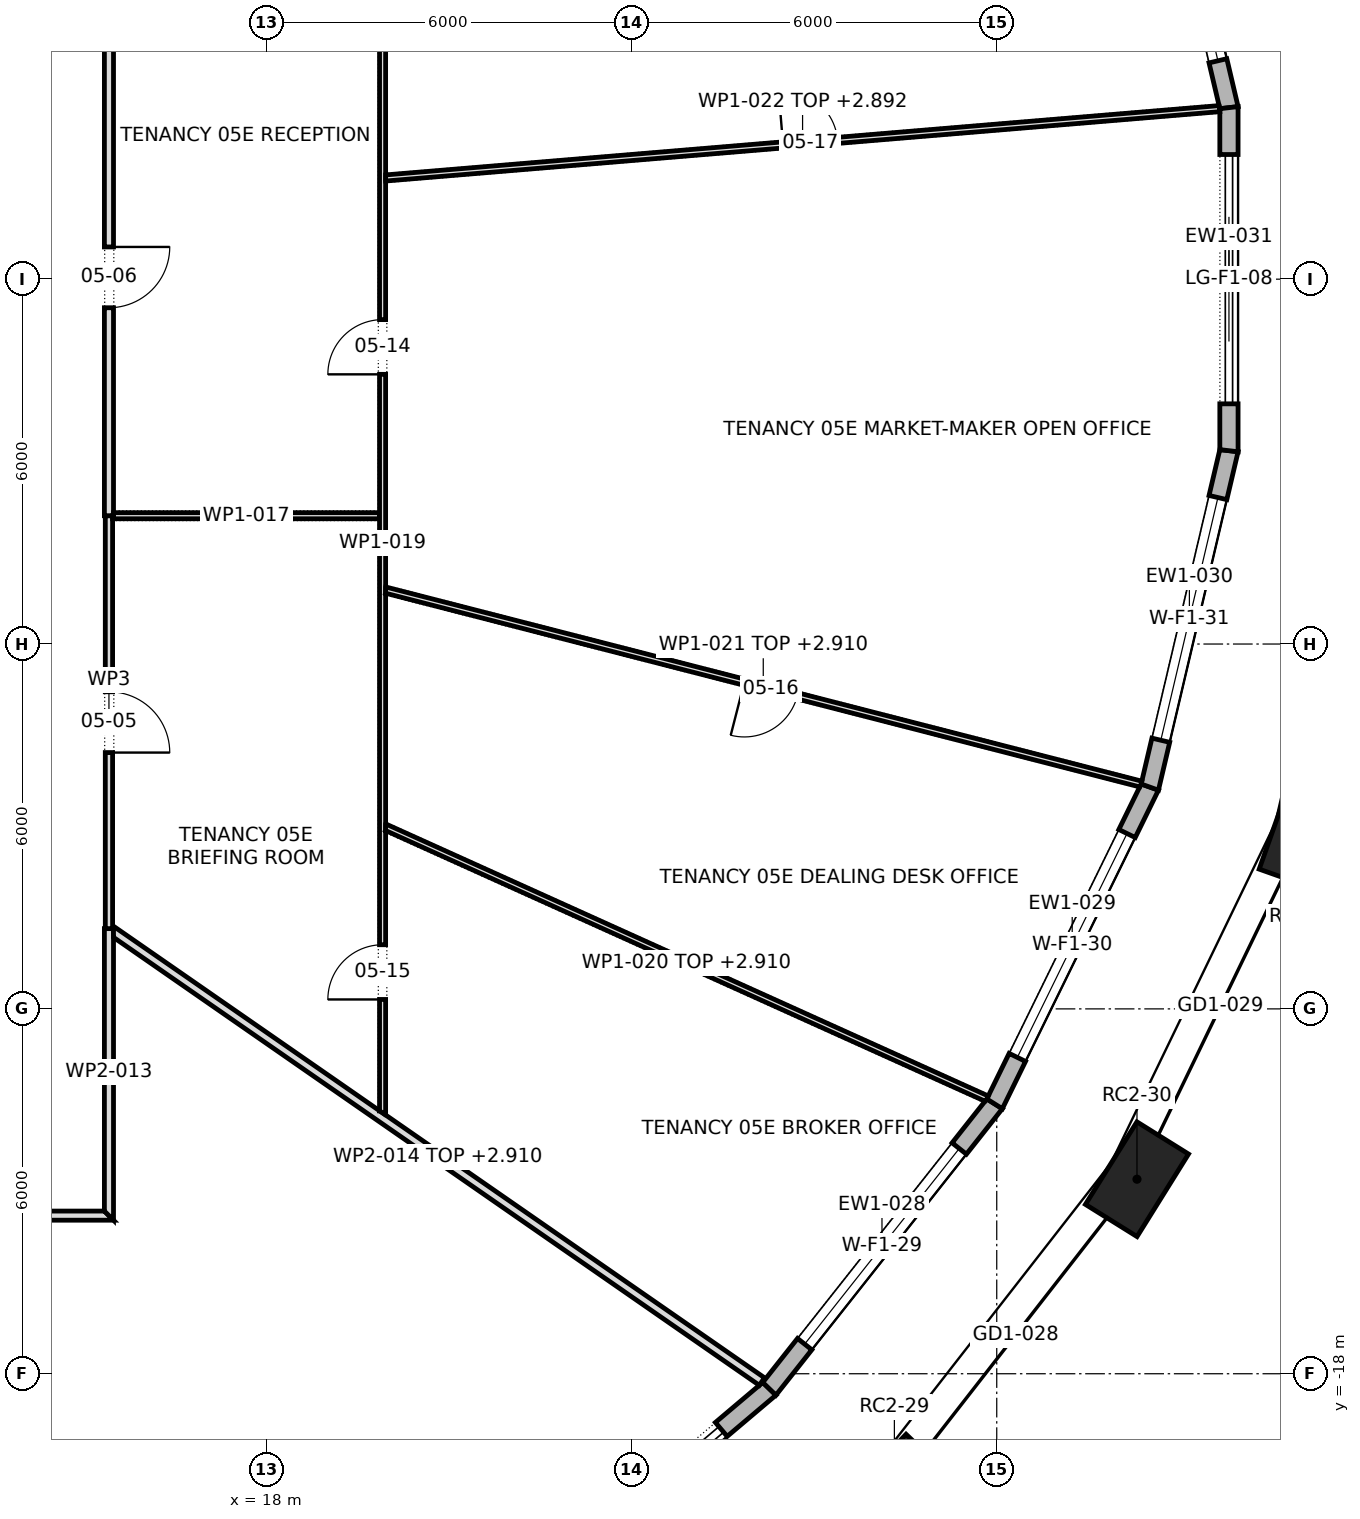
"""IFC4 building model, lengths in metres.
Left out: names, types, materials, properties, quantities, classifications, styles, units other than length and angle.
Written with IfcOpenShell. Run it as: python <this file> out.ifc"""

import sys

from ifc_helpers import new_model, si_unit, direction, frame, frame_2d, origin, origin_2d, place, context, subcontext, project, spatial, polyline, rectangle, outline, extrude, element, fill, save


model = new_model("IFC4")
c1 = context("Model", 3, precision=1e-05, world=origin(), true_north=direction((0.0, 1.0)))
c2 = subcontext(c1, "Body", "Model", "MODEL_VIEW")
j1 = project(units=[si_unit("LENGTHUNIT", "METRE"), si_unit("PLANEANGLEUNIT", "RADIAN")], contexts=[c1])
p1 = place(None, origin())
s1 = spatial("IfcSite", under=j1, at=p1, CompositionType="ELEMENT")
p2 = place(p1, origin())
s2 = spatial("IfcBuilding", under=s1, at=p2, CompositionType="ELEMENT")
p3 = place(p2, frame((0.0, 0.0, 73.9)))
s3 = spatial("IfcBuildingStorey", under=s2, at=p3, CompositionType="ELEMENT", Elevation=73.9)
for number, where, z_axis, x_axis in (
    (1, (28.317, -19.919, 0.0), (0.0, 0.0, 1.0), (0.692, 0.722, 0.0)),
    (2, (32.306, -14.801, 0.0), (0.0, 0.0, 1.0), (0.529, 0.849, 0.0)),
    (3, (35.054, -9.115, 0.0), (0.0, 0.0, 1.0), (0.334, 0.943, 0.0)),
):
    element("IfcColumn", number, at=place(p3, frame(where, z_axis=z_axis, x_axis=x_axis)), inside=s3, PredefinedType="COLUMN", context=c2, shape_type="SweptSolid", body=[
        extrude(rectangle(XDim=1.6, YDim=1.0, at=origin_2d()), origin(), (0.0, 0.0, 1.0), 4.2),
    ])
p4 = place(p3, frame((33.819, 2.821, 0.0), z_axis=(0.0, 0.0, 1.0), x_axis=(-0.229058489262, 0.97341266095, 0.0)))
e4 = element("IfcWall", 4, at=p4, inside=s3, PredefinedType="STANDARD", context=c2, shape_type="SweptSolid", body=[
    extrude(outline(polyline([(-0.017, -0.15), (5.7, -0.15), (5.666, 0.15), (0.017, 0.15), (-0.017, -0.15)])), origin(), (0.0, 0.0, 1.0), 3.9),
])
p5 = place(p4, frame((0.792, 0.0, 0.6)))
e5 = element("IfcOpeningElement", 5, at=p5, cuts=e4, PredefinedType="OPENING", context=c2, shape_type="SweptSolid", body=[
    extrude(rectangle(XDim=4.1, YDim=2.85, at=frame_2d((2.05, 1.425))), frame((0.0, 0.162, 0.0), z_axis=(0.0, -1.0, 0.0), x_axis=(1.0, 0.0, 0.0)), (0.0, 0.0, 1.0), 0.324),
])
p6 = place(p3, frame((21.549, -22.231, 0.0), z_axis=(0.0, 0.0, 1.0), x_axis=(0.763693886759, 0.645578536916, 0.0)))
e6 = element("IfcWall", 6, at=p6, inside=s3, PredefinedType="STANDARD", context=c2, shape_type="SweptSolid", body=[
    extrude(outline(polyline([(-0.014, -0.15), (6.185, -0.15), (6.155, 0.15), (0.014, 0.15), (-0.014, -0.15)])), origin(), (0.0, 0.0, 1.0), 3.9),
])
p7 = place(p6, frame((1.035, 0.0, 0.0)))
e7 = element("IfcOpeningElement", 7, at=p7, cuts=e6, PredefinedType="OPENING", context=c2, shape_type="SweptSolid", body=[
    extrude(rectangle(XDim=4.1, YDim=3.45, at=frame_2d((2.05, 1.725))), frame((0.0, 0.162, 0.0), z_axis=(0.0, -1.0, 0.0), x_axis=(1.0, 0.0, 0.0)), (0.0, 0.0, 1.0), 0.324),
])
p8 = place(p3, frame((26.26, -18.248, 0.0), z_axis=(0.0, 0.0, 1.0), x_axis=(0.620093447965, 0.784527957303, 0.0)))
e8 = element("IfcWall", 8, at=p8, inside=s3, PredefinedType="STANDARD", context=c2, shape_type="SweptSolid", body=[
    extrude(outline(polyline([(-0.015, -0.15), (5.989, -0.15), (5.957, 0.15), (0.015, 0.15), (-0.015, -0.15)])), origin(), (0.0, 0.0, 1.0), 3.9),
])
p9 = place(p8, frame((0.937, 0.0, 0.6)))
e9 = element("IfcOpeningElement", 9, at=p9, cuts=e8, PredefinedType="OPENING", context=c2, shape_type="SweptSolid", body=[
    extrude(rectangle(XDim=4.1, YDim=2.85, at=frame_2d((2.05, 1.425))), frame((0.0, 0.162, 0.0), z_axis=(0.0, -1.0, 0.0), x_axis=(1.0, 0.0, 0.0)), (0.0, 0.0, 1.0), 0.324),
])
p10 = place(p3, frame((29.964, -13.562, 0.0), z_axis=(0.0, 0.0, 1.0), x_axis=(0.440027465772, 0.897984314655, 0.0)))
e10 = element("IfcWall", 10, at=p10, inside=s3, PredefinedType="STANDARD", context=c2, shape_type="SweptSolid", body=[
    extrude(outline(polyline([(-0.016, -0.15), (5.818, -0.15), (5.784, 0.15), (0.016, 0.15), (-0.016, -0.15)])), origin(), (0.0, 0.0, 1.0), 3.9),
])
p11 = place(p10, frame((0.85, 0.0, 0.6)))
e11 = element("IfcOpeningElement", 11, at=p11, cuts=e10, PredefinedType="OPENING", context=c2, shape_type="SweptSolid", body=[
    extrude(rectangle(XDim=4.1, YDim=2.85, at=frame_2d((2.05, 1.425))), frame((0.0, 0.162, 0.0), z_axis=(0.0, -1.0, 0.0), x_axis=(1.0, 0.0, 0.0)), (0.0, 0.0, 1.0), 0.324),
])
p12 = place(p3, frame((32.517, -8.353, 0.0), z_axis=(0.0, 0.0, 1.0), x_axis=(0.229058489262, 0.97341266095, 0.0)))
e12 = element("IfcWall", 12, at=p12, inside=s3, PredefinedType="STANDARD", context=c2, shape_type="SweptSolid", body=[
    extrude(outline(polyline([(-0.017, -0.15), (5.7, -0.15), (5.666, 0.15), (0.017, 0.15), (-0.017, -0.15)])), origin(), (0.0, 0.0, 1.0), 3.9),
])
p13 = place(p12, frame((0.792, 0.0, 0.6)))
e13 = element("IfcOpeningElement", 13, at=p13, cuts=e12, PredefinedType="OPENING", context=c2, shape_type="SweptSolid", body=[
    extrude(rectangle(XDim=4.1, YDim=2.85, at=frame_2d((2.05, 1.425))), frame((0.0, 0.162, 0.0), z_axis=(0.0, -1.0, 0.0), x_axis=(1.0, 0.0, 0.0)), (0.0, 0.0, 1.0), 0.324),
])
p14 = place(p3, frame((33.819, -2.821, 0.0), z_axis=(0.0, 0.0, 1.0), x_axis=(0.0, 1.0, 0.0)))
e14 = element("IfcWall", 14, at=p14, inside=s3, PredefinedType="STANDARD", context=c2, shape_type="SweptSolid", body=[
    extrude(outline(polyline([(-0.017, -0.15), (5.658, -0.15), (5.624, 0.15), (0.017, 0.15), (-0.017, -0.15)])), origin(), (0.0, 0.0, 1.0), 3.9),
])
p15 = place(p14, frame((0.771, 0.0, 0.0)))
e15 = element("IfcOpeningElement", 15, at=p15, cuts=e14, PredefinedType="OPENING", context=c2, shape_type="SweptSolid", body=[
    extrude(rectangle(XDim=4.1, YDim=3.45, at=frame_2d((2.05, 1.725))), frame((0.0, 0.162, 0.0), z_axis=(0.0, -1.0, 0.0), x_axis=(1.0, 0.0, 0.0)), (0.0, 0.0, 1.0), 0.324),
])
p16 = place(p3, frame((-15.475, -15.4, 0.0), z_axis=(0.0, 0.0, 1.0), x_axis=(1.0, 0.0, 0.0)))
e16 = element("IfcWall", 16, at=p16, inside=s3, PredefinedType="PARTITIONING", context=c2, shape_type="SweptSolid", body=[
    extrude(outline(polyline([(0.0, -0.075), (1.935, -0.075), (3.869, -0.075), (5.803, -0.075), (7.738, -0.075), (9.672, -0.075), (11.606, -0.075), (13.541, -0.075), (15.475, -0.075), (17.409, -0.075), (19.344, -0.075), (21.278, -0.075), (23.212, -0.075), (25.147, -0.075), (27.081, -0.075), (29.016, -0.075), (30.95, -0.075), (30.8, 0.075), (28.885, 0.075), (26.969, 0.075), (25.053, 0.075), (23.138, 0.075), (21.222, 0.075), (19.306, 0.075), (17.391, 0.075), (15.475, 0.075), (13.56, 0.075), (11.644, 0.075), (9.728, 0.075), (7.812, 0.075), (5.897, 0.075), (3.981, 0.075), (2.066, 0.075), (0.15, 0.075), (0.0, -0.075)])), origin(), (0.0, 0.0, 1.0), 3.9),
])
p17 = place(p16, frame((2.405, 0.0, 0.0)))
e17 = element("IfcOpeningElement", 17, at=p17, cuts=e16, PredefinedType="OPENING", context=c2, shape_type="SweptSolid", body=[
    extrude(rectangle(XDim=1.0, YDim=2.1, at=frame_2d((0.5, 1.05))), frame((0.0, 0.087, 0.0), z_axis=(0.0, -1.0, 0.0), x_axis=(1.0, 0.0, 0.0)), (0.0, 0.0, 1.0), 0.174),
])
p18 = place(p16, frame((12.47, 0.0, 0.0)))
e18 = element("IfcOpeningElement", 18, at=p18, cuts=e16, PredefinedType="OPENING", context=c2, shape_type="SweptSolid", body=[
    extrude(rectangle(XDim=1.8, YDim=2.1, at=frame_2d((0.9, 1.05))), frame((0.0, 0.087, 0.0), z_axis=(0.0, -1.0, 0.0), x_axis=(1.0, 0.0, 0.0)), (0.0, 0.0, 1.0), 0.174),
])
p19 = place(p16, frame((25.04, 0.0, 0.0)))
e19 = element("IfcOpeningElement", 19, at=p19, cuts=e16, PredefinedType="OPENING", context=c2, shape_type="SweptSolid", body=[
    extrude(rectangle(XDim=1.8, YDim=2.1, at=frame_2d((0.9, 1.05))), frame((0.0, 0.087, 0.0), z_axis=(0.0, -1.0, 0.0), x_axis=(1.0, 0.0, 0.0)), (0.0, 0.0, 1.0), 0.174),
])
p20 = place(p3, frame((15.4, -10.68, 0.0), z_axis=(0.0, 0.0, 1.0), x_axis=(0.0, -1.0, 0.0)))
e20 = element("IfcWall", 20, at=p20, inside=s3, PredefinedType="PARTITIONING", context=c2, shape_type="SweptSolid", body=[
    extrude(outline(polyline([(0.0, -0.075), (1.548, -0.075), (3.097, -0.075), (4.645, -0.075), (4.795, 0.075), (3.197, 0.075), (1.598, 0.075), (0.0, 0.075), (0.0, -0.075)])), origin(), (0.0, 0.0, 1.0), 3.9),
])
p21 = place(p3, frame((15.418, -10.692, 0.0), z_axis=(0.0, 0.0, 1.0), x_axis=(0.821683258501, -0.569944403166, 0.0)))
e21 = element("IfcWall", 21, at=p21, inside=s3, PredefinedType="PARTITIONING", context=c2, shape_type="SweptSolid", body=[
    extrude(outline(polyline([(13.047, 0.075), (11.122, 0.075), (9.196, 0.075), (7.271, 0.075), (5.346, 0.075), (5.343, 0.073), (5.342, 0.075), (3.562, 0.075), (1.781, 0.075), (0.0, 0.075), (0.0, 0.074), (0.028, 0.034), (0.04, 0.043), (0.122, -0.075), (1.968, -0.075), (3.815, -0.075), (5.661, -0.075), (7.508, -0.075), (9.354, -0.075), (11.2, -0.075), (13.047, -0.075), (13.047, 0.075)])), origin(), (0.0, 0.0, 1.0), 2.91),
])
p22 = place(p3, frame((15.4, -3.89, 0.0), z_axis=(0.0, 0.0, 1.0), x_axis=(0.0, -1.0, 0.0)))
e22 = element("IfcWall", 22, at=p22, inside=s3, PredefinedType="PARTITIONING", context=c2, shape_type="SweptSolid", body=[
    extrude(rectangle(XDim=6.79, YDim=0.12, at=frame_2d((3.395, 0.0))), origin(), (0.0, 0.0, 1.0), 3.9),
])
p23 = place(p22, frame((2.895, 0.0, 0.0)))
e23 = element("IfcOpeningElement", 23, at=p23, cuts=e22, PredefinedType="OPENING", context=c2, shape_type="SweptSolid", body=[
    extrude(rectangle(XDim=1.0, YDim=2.1, at=frame_2d((0.5, 1.05))), frame((0.0, 0.072, 0.0), z_axis=(0.0, -1.0, 0.0), x_axis=(1.0, 0.0, 0.0)), (0.0, 0.0, 1.0), 0.144),
])
p24 = place(p3, frame((15.4, -3.89, 0.0), z_axis=(0.0, 0.0, 1.0), x_axis=(0.0, 1.0, 0.0)))
e24 = element("IfcWall", 24, at=p24, inside=s3, PredefinedType="PARTITIONING", context=c2, shape_type="SweptSolid", body=[
    extrude(outline(polyline([(0.0, -0.075), (1.937, -0.075), (3.873, -0.075), (5.809, -0.075), (7.746, -0.075), (9.682, -0.075), (11.619, -0.075), (13.555, -0.075), (15.492, -0.075), (17.428, -0.075), (19.365, -0.075), (19.215, 0.075), (17.293, 0.075), (15.372, 0.075), (13.45, 0.075), (11.529, 0.075), (9.607, 0.075), (7.686, 0.075), (5.764, 0.075), (3.843, 0.075), (1.921, 0.075), (0.0, 0.075), (0.0, -0.075)])), origin(), (0.0, 0.0, 1.0), 3.9),
])
p25 = place(p24, frame((3.42, 0.0, 0.0)))
e25 = element("IfcOpeningElement", 25, at=p25, cuts=e24, PredefinedType="OPENING", context=c2, shape_type="SweptSolid", body=[
    extrude(rectangle(XDim=1.0, YDim=2.1, at=frame_2d((0.5, 1.05))), frame((0.0, 0.087, 0.0), z_axis=(0.0, -1.0, 0.0), x_axis=(1.0, 0.0, 0.0)), (0.0, 0.0, 1.0), 0.174),
])
p26 = place(p3, frame((15.46, -3.89, 0.0), z_axis=(0.0, 0.0, 1.0), x_axis=(1.0, 0.0, 0.0)))
e26 = element("IfcWall", 26, at=p26, inside=s3, PredefinedType="PARTITIONING", context=c2, shape_type="SweptSolid", body=[
    extrude(outline(polyline([(0.0, -0.05), (1.463, -0.05), (2.926, -0.05), (4.39, -0.05), (4.39, 0.05), (2.931, 0.05), (1.473, 0.05), (0.015, 0.05), (0.015, 0.0), (0.0, 0.0), (0.0, -0.05)])), origin(), (0.0, 0.0, 1.0), 3.9),
])
p27 = place(p3, frame((19.9, -13.744, 0.0), z_axis=(0.0, 0.0, 1.0), x_axis=(0.0, 1.0, 0.0)))
e27 = element("IfcWall", 27, at=p27, inside=s3, PredefinedType="PARTITIONING", context=c2, shape_type="SweptSolid", body=[
    extrude(outline(polyline([(0.0, -0.05), (1.559, -0.05), (3.118, -0.05), (4.677, -0.05), (4.678, -0.048), (4.683, -0.05), (6.631, -0.05), (8.58, -0.05), (8.58, -0.048), (8.588, -0.05), (10.286, -0.05), (11.985, -0.05), (13.683, -0.05), (15.382, -0.05), (17.081, -0.05), (18.779, -0.05), (18.779, -0.048), (18.754, 0.05), (16.984, 0.05), (15.214, 0.05), (13.444, 0.05), (11.674, 0.05), (9.904, 0.05), (9.904, 0.05), (9.804, 0.05), (9.804, 0.05), (7.857, 0.05), (5.91, 0.05), (3.963, 0.05), (2.016, 0.05), (0.069, 0.05), (0.0, -0.05), (0.0, -0.05)])), origin(), (0.0, 0.0, 1.0), 3.9),
])
p28 = place(p27, frame((12.179, 0.0, 0.0)))
e28 = element("IfcOpeningElement", 28, at=p28, cuts=e27, PredefinedType="OPENING", context=c2, shape_type="SweptSolid", body=[
    extrude(rectangle(XDim=0.9, YDim=2.1, at=frame_2d((0.45, 1.05))), frame((0.0, 0.062, 0.0), z_axis=(0.0, -1.0, 0.0), x_axis=(1.0, 0.0, 0.0)), (0.0, 0.0, 1.0), 0.124),
])
p29 = place(p27, frame((1.899, 0.0, 0.0)))
e29 = element("IfcOpeningElement", 29, at=p29, cuts=e27, PredefinedType="OPENING", context=c2, shape_type="SweptSolid", body=[
    extrude(rectangle(XDim=0.9, YDim=2.1, at=frame_2d((0.45, 1.05))), frame((0.0, 0.062, 0.0), z_axis=(0.0, -1.0, 0.0), x_axis=(1.0, 0.0, 0.0)), (0.0, 0.0, 1.0), 0.124),
])
p30 = place(p3, frame((19.93, -9.003, 0.0), z_axis=(0.0, 0.0, 1.0), x_axis=(0.911407001064, -0.41150610981, 0.0)))
e30 = element("IfcWall", 30, at=p30, inside=s3, PredefinedType="PARTITIONING", context=c2, shape_type="SweptSolid", body=[
    extrude(outline(polyline([(0.045, -0.05), (1.847, -0.05), (3.65, -0.05), (5.453, -0.05), (7.255, -0.05), (9.058, -0.05), (10.861, -0.05), (10.872, -0.004), (10.874, 0.05), (9.062, 0.05), (7.249, 0.05), (5.437, 0.05), (3.625, 0.05), (1.812, 0.05), (0.0, 0.05), (0.0, 0.049), (0.045, -0.05)])), origin(), (0.0, 0.0, 1.0), 2.91),
])
p31 = place(p3, frame((19.938, -5.11, 0.0), z_axis=(0.0, 0.0, 1.0), x_axis=(0.96855855203, -0.248785713594, 0.0)))
e31 = element("IfcWall", 31, at=p31, inside=s3, PredefinedType="PARTITIONING", context=c2, shape_type="SweptSolid", body=[
    extrude(outline(polyline([(0.025, -0.05), (1.855, -0.05), (3.684, -0.05), (5.513, -0.05), (7.342, -0.05), (9.171, -0.05), (11.0, -0.05), (12.829, -0.05), (12.839, -0.005), (12.839, 0.05), (11.005, 0.05), (9.17, 0.05), (7.336, 0.05), (5.502, 0.05), (3.668, 0.05), (1.834, 0.05), (0.0, 0.05), (0.0, 0.049), (0.025, -0.05)])), origin(), (0.0, 0.0, 1.0), 2.91),
])
p32 = place(p31, frame((6.103, 0.0, 0.0)))
e32 = element("IfcOpeningElement", 32, at=p32, cuts=e31, PredefinedType="OPENING", context=c2, shape_type="SweptSolid", body=[
    extrude(rectangle(XDim=0.9, YDim=2.1, at=frame_2d((0.45, 1.05))), frame((0.0, 0.062, 0.0), z_axis=(0.0, -1.0, 0.0), x_axis=(1.0, 0.0, 0.0)), (0.0, 0.0, 1.0), 0.124),
])
p33 = place(p3, frame((19.946, 1.664, 0.0), z_axis=(0.0, 0.0, 1.0), x_axis=(0.996559566172, 0.082879617945, 0.0)))
e33 = element("IfcWall", 33, at=p33, inside=s3, PredefinedType="PARTITIONING", context=c2, shape_type="SweptSolid", body=[
    extrude(outline(polyline([(13.765, -0.05), (13.765, 0.026), (13.762, 0.05), (11.797, 0.05), (9.832, 0.05), (7.867, 0.05), (5.902, 0.05), (3.938, 0.05), (1.973, 0.05), (0.008, 0.05), (0.0, -0.045), (0.0, -0.05), (1.967, -0.05), (3.933, -0.05), (5.899, -0.05), (7.866, -0.05), (9.833, -0.05), (11.799, -0.05), (13.765, -0.05)])), origin(), (0.0, 0.0, 1.0), 2.892),
])
p34 = place(p33, frame((6.563, 0.0, 0.0)))
e34 = element("IfcOpeningElement", 34, at=p34, cuts=e33, PredefinedType="OPENING", context=c2, shape_type="SweptSolid", body=[
    extrude(rectangle(XDim=0.9, YDim=2.1, at=frame_2d((0.45, 1.05))), frame((0.0, 0.062, 0.0), z_axis=(0.0, -1.0, 0.0), x_axis=(1.0, 0.0, 0.0)), (0.0, 0.0, 1.0), 0.124),
])
p35 = place(p5, origin())
e35 = element("IfcWindow", 35, at=p35, inside=s3, PartitioningType="TRIPLE_PANEL_VERTICAL", PredefinedType="WINDOW", context=c2, shape_type="SweptSolid", body=[
    extrude(rectangle(XDim=4.1, YDim=2.85, at=frame_2d((2.05, 1.425))), frame((0.0, 0.03, 0.0), z_axis=(0.0, -1.0, 0.0), x_axis=(1.0, 0.0, 0.0)), (0.0, 0.0, 1.0), 0.06),
])
fill(e5, e35)
p36 = place(p7, origin())
e36 = element("IfcDoor", 36, at=p36, inside=s3, OperationType="DOUBLE_DOOR_SLIDING", PredefinedType="DOOR", context=c2, shape_type="SweptSolid", body=[
    extrude(rectangle(XDim=4.1, YDim=3.45, at=frame_2d((2.05, 1.725))), frame((0.0, 0.025, 0.0), z_axis=(0.0, -1.0, 0.0), x_axis=(1.0, 0.0, 0.0)), (0.0, 0.0, 1.0), 0.05),
])
fill(e7, e36)
p37 = place(p9, origin())
e37 = element("IfcWindow", 37, at=p37, inside=s3, PartitioningType="TRIPLE_PANEL_VERTICAL", PredefinedType="WINDOW", context=c2, shape_type="SweptSolid", body=[
    extrude(rectangle(XDim=4.1, YDim=2.85, at=frame_2d((2.05, 1.425))), frame((0.0, 0.03, 0.0), z_axis=(0.0, -1.0, 0.0), x_axis=(1.0, 0.0, 0.0)), (0.0, 0.0, 1.0), 0.06),
])
fill(e9, e37)
p38 = place(p11, origin())
e38 = element("IfcWindow", 38, at=p38, inside=s3, PartitioningType="TRIPLE_PANEL_VERTICAL", PredefinedType="WINDOW", context=c2, shape_type="SweptSolid", body=[
    extrude(rectangle(XDim=4.1, YDim=2.85, at=frame_2d((2.05, 1.425))), frame((0.0, 0.03, 0.0), z_axis=(0.0, -1.0, 0.0), x_axis=(1.0, 0.0, 0.0)), (0.0, 0.0, 1.0), 0.06),
])
fill(e11, e38)
p39 = place(p13, origin())
e39 = element("IfcWindow", 39, at=p39, inside=s3, PartitioningType="TRIPLE_PANEL_VERTICAL", PredefinedType="WINDOW", context=c2, shape_type="SweptSolid", body=[
    extrude(rectangle(XDim=4.1, YDim=2.85, at=frame_2d((2.05, 1.425))), frame((0.0, 0.03, 0.0), z_axis=(0.0, -1.0, 0.0), x_axis=(1.0, 0.0, 0.0)), (0.0, 0.0, 1.0), 0.06),
])
fill(e13, e39)
p40 = place(p15, origin())
e40 = element("IfcDoor", 40, at=p40, inside=s3, OperationType="DOUBLE_DOOR_SLIDING", PredefinedType="DOOR", context=c2, shape_type="SweptSolid", body=[
    extrude(rectangle(XDim=4.1, YDim=3.45, at=frame_2d((2.05, 1.725))), frame((0.0, 0.025, 0.0), z_axis=(0.0, -1.0, 0.0), x_axis=(1.0, 0.0, 0.0)), (0.0, 0.0, 1.0), 0.05),
])
fill(e15, e40)
p41 = place(p23, origin())
e41 = element("IfcDoor", 41, at=p41, inside=s3, OperationType="SINGLE_SWING_LEFT", PredefinedType="DOOR", context=c2, shape_type="SweptSolid", body=[
    extrude(rectangle(XDim=1.0, YDim=2.1, at=frame_2d((0.5, 1.05))), frame((0.0, 0.025, 0.0), z_axis=(0.0, -1.0, 0.0), x_axis=(1.0, 0.0, 0.0)), (0.0, 0.0, 1.0), 0.05),
])
fill(e23, e41)
p42 = place(p25, frame((1.0, 0.0, 0.0), z_axis=(0.0, 0.0, 1.0), x_axis=(-1.0, 0.0, 0.0)))
e42 = element("IfcDoor", 42, at=p42, inside=s3, OperationType="SINGLE_SWING_RIGHT", PredefinedType="DOOR", context=c2, shape_type="SweptSolid", body=[
    extrude(rectangle(XDim=1.0, YDim=2.1, at=frame_2d((0.5, 1.05))), frame((0.0, 0.025, 0.0), z_axis=(0.0, -1.0, 0.0), x_axis=(1.0, 0.0, 0.0)), (0.0, 0.0, 1.0), 0.05),
])
fill(e25, e42)
p43 = place(p28, origin())
e43 = element("IfcDoor", 43, at=p43, inside=s3, OperationType="SINGLE_SWING_RIGHT", PredefinedType="DOOR", context=c2, shape_type="SweptSolid", body=[
    extrude(rectangle(XDim=0.9, YDim=2.1, at=frame_2d((0.45, 1.05))), frame((0.0, 0.025, 0.0), z_axis=(0.0, -1.0, 0.0), x_axis=(1.0, 0.0, 0.0)), (0.0, 0.0, 1.0), 0.05),
])
fill(e28, e43)
p44 = place(p29, origin())
e44 = element("IfcDoor", 44, at=p44, inside=s3, OperationType="SINGLE_SWING_RIGHT", PredefinedType="DOOR", context=c2, shape_type="SweptSolid", body=[
    extrude(rectangle(XDim=0.9, YDim=2.1, at=frame_2d((0.45, 1.05))), frame((0.0, 0.025, 0.0), z_axis=(0.0, -1.0, 0.0), x_axis=(1.0, 0.0, 0.0)), (0.0, 0.0, 1.0), 0.05),
])
fill(e29, e44)
p45 = place(p32, frame((0.9, 0.0, 0.0), z_axis=(0.0, 0.0, 1.0), x_axis=(-1.0, 0.0, 0.0)))
e45 = element("IfcDoor", 45, at=p45, inside=s3, OperationType="SINGLE_SWING_LEFT", PredefinedType="DOOR", context=c2, shape_type="SweptSolid", body=[
    extrude(rectangle(XDim=0.9, YDim=2.1, at=frame_2d((0.45, 1.05))), frame((0.0, 0.025, 0.0), z_axis=(0.0, -1.0, 0.0), x_axis=(1.0, 0.0, 0.0)), (0.0, 0.0, 1.0), 0.05),
])
fill(e32, e45)
p46 = place(p34, origin())
e46 = element("IfcDoor", 46, at=p46, inside=s3, OperationType="SINGLE_SWING_RIGHT", PredefinedType="DOOR", context=c2, shape_type="SweptSolid", body=[
    extrude(rectangle(XDim=0.9, YDim=2.1, at=frame_2d((0.45, 1.05))), frame((0.0, 0.025, 0.0), z_axis=(0.0, -1.0, 0.0), x_axis=(1.0, 0.0, 0.0)), (0.0, 0.0, 1.0), 0.05),
])
fill(e34, e46)
save(model, sys.argv[1])
